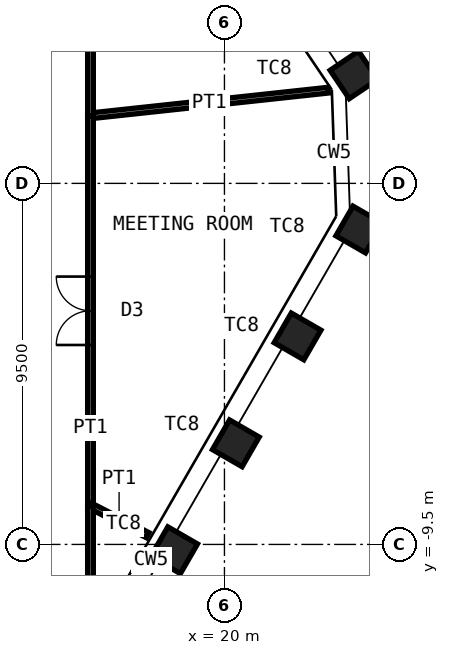
"""IFC4 building model, lengths in metres.
Left out: names, types, materials, properties, quantities, classifications, styles, units other than length and angle.
Written with IfcOpenShell. Run it as: python <this file> out.ifc"""

import sys

from ifc_helpers import new_model, si_unit, direction, frame, frame_2d, origin, origin_2d, place, context, subcontext, project, spatial, rectangle, hollow_rectangle, extrude, element, fill, save


model = new_model("IFC4")
c1 = context("Model", 3, precision=1e-05, world=origin(), true_north=direction((0.0, 1.0)))
c2 = subcontext(c1, "Body", "Model", "MODEL_VIEW")
j1 = project(units=[si_unit("LENGTHUNIT", "METRE"), si_unit("PLANEANGLEUNIT", "RADIAN")], contexts=[c1])
p1 = place(None, origin())
s1 = spatial("IfcSite", under=j1, at=p1, CompositionType="ELEMENT")
p2 = place(p1, origin())
s2 = spatial("IfcBuilding", under=s1, at=p2, CompositionType="ELEMENT")
p3 = place(p2, frame((0.0, 0.0, 312.4)))
s3 = spatial("IfcBuildingStorey", under=s2, at=p3, CompositionType="ELEMENT", Elevation=312.4)
for number, where, z_axis, x_axis in (
    (1, (23.406, 2.854, 0.0), (0.0, 0.0, 1.0), (-0.559, 0.829, 0.0)),
    (2, (23.548, -1.214, 0.0), (0.0, 0.0, 1.0), (0.5, 0.866, 0.0)),
    (3, (21.924, -4.027, 0.0), (0.0, 0.0, 1.0), (0.5, 0.866, 0.0)),
    (4, (20.3, -6.84, 0.0), (0.0, 0.0, 1.0), (0.5, 0.866, 0.0)),
    (5, (18.676, -9.653, 0.0), (0.0, 0.0, 1.0), (0.5, 0.866, 0.0)),
):
    element("IfcColumn", number, at=place(p3, frame(where, z_axis=z_axis, x_axis=x_axis)), inside=s3, PredefinedType="COLUMN", context=c2, shape_type="SweptSolid", body=[
        extrude(hollow_rectangle(XDim=0.9, YDim=0.9, WallThickness=0.05, at=origin_2d()), origin(), (0.0, 0.0, 1.0), 4.2),
    ])
p4 = place(p3, frame((22.726, 2.452, 0.0), z_axis=(0.0, 0.0, 1.0), x_axis=(-0.994231470971, -0.107255685772, 0.0)))
e6 = element("IfcWall", 6, at=p4, inside=s3, PredefinedType="PARTITIONING", context=c2, shape_type="SweptSolid", body=[
    extrude(rectangle(XDim=6.287, YDim=0.15, at=frame_2d((3.144, 0.0))), origin(), (0.0, 0.0, 1.0), 4.03),
])
p5 = place(p3, frame((16.475, 1.777, 0.0), z_axis=(0.0, 0.0, 1.0), x_axis=(0.0, -1.0, 0.0)))
e7 = element("IfcWall", 7, at=p5, inside=s3, PredefinedType="PARTITIONING", context=c2, shape_type="SweptSolid", body=[
    extrude(rectangle(XDim=10.259, YDim=0.15, at=frame_2d((5.13, 0.0))), origin(), (0.0, 0.0, 1.0), 4.03),
])
p6 = place(p5, frame((4.23, 0.0, 0.0)))
e8 = element("IfcOpeningElement", 8, at=p6, cuts=e7, PredefinedType="OPENING", context=c2, shape_type="SweptSolid", body=[
    extrude(rectangle(XDim=1.8, YDim=2.4, at=frame_2d((0.9, 1.2))), frame((0.0, 0.085, 0.0), z_axis=(0.0, -1.0, 0.0), x_axis=(1.0, 0.0, 0.0)), (0.0, 0.0, 1.0), 0.17),
])
p7 = place(p3, frame((17.98, -9.257, 0.0), z_axis=(0.0, 0.0, 1.0), x_axis=(-0.889058145064, 0.457794292991, 0.0)))
e9 = element("IfcWall", 9, at=p7, inside=s3, PredefinedType="PARTITIONING", context=c2, shape_type="SweptSolid", body=[
    extrude(rectangle(XDim=1.693, YDim=0.15, at=frame_2d((0.847, 0.0))), origin(), (0.0, 0.0, 1.0), 3.33),
])
p8 = place(p3, frame((16.475, -8.482, 0.0), z_axis=(0.0, 0.0, 1.0), x_axis=(0.0, -1.0, 0.0)))
e10 = element("IfcWall", 10, at=p8, inside=s3, PredefinedType="PARTITIONING", context=c2, shape_type="SweptSolid", body=[
    extrude(rectangle(XDim=2.793, YDim=0.15, at=frame_2d((1.396, 0.0))), origin(), (0.0, 0.0, 1.0), 4.03),
])
p9 = place(p3, frame((16.475, 11.275, 0.0), z_axis=(0.0, 0.0, 1.0), x_axis=(0.0, -1.0, 0.0)))
e11 = element("IfcWall", 11, at=p9, inside=s3, PredefinedType="PARTITIONING", context=c2, shape_type="SweptSolid", body=[
    extrude(rectangle(XDim=9.498, YDim=0.15, at=frame_2d((4.749, 0.0))), origin(), (0.0, 0.0, 1.0), 4.03),
])
p10 = place(p9, frame((3.849, 0.0, 0.0)))
e12 = element("IfcOpeningElement", 12, at=p10, cuts=e11, PredefinedType="OPENING", context=c2, shape_type="SweptSolid", body=[
    extrude(rectangle(XDim=1.8, YDim=2.4, at=frame_2d((0.9, 1.2))), frame((0.0, 0.085, 0.0), z_axis=(0.0, -1.0, 0.0), x_axis=(1.0, 0.0, 0.0)), (0.0, 0.0, 1.0), 0.17),
])
p11 = place(p6, origin())
e13 = element("IfcDoor", 13, at=p11, inside=s3, OperationType="DOUBLE_DOOR_DOUBLE_SWING", PredefinedType="DOOR", context=c2, shape_type="SweptSolid", body=[
    extrude(rectangle(XDim=1.8, YDim=2.4, at=frame_2d((0.9, 1.2))), frame((0.0, 0.025, 0.0), z_axis=(0.0, -1.0, 0.0), x_axis=(1.0, 0.0, 0.0)), (0.0, 0.0, 1.0), 0.05),
])
fill(e8, e13)
save(model, sys.argv[1])
